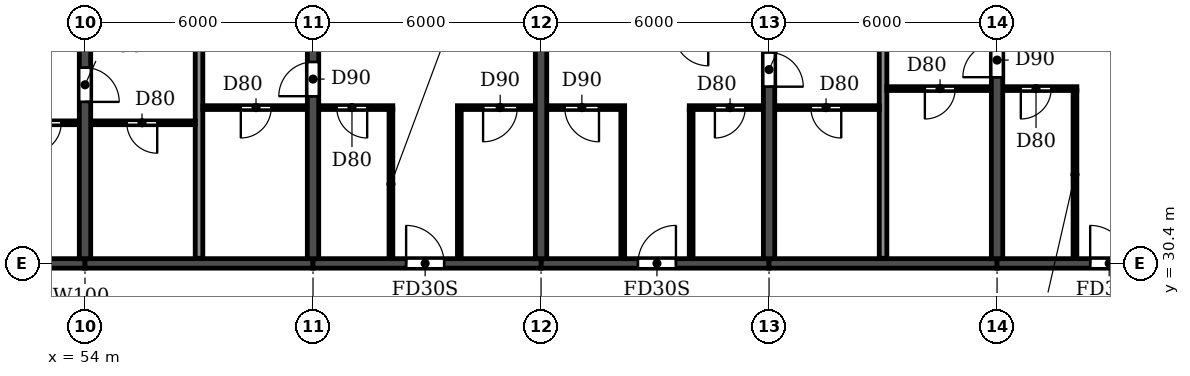
"""IFC4 building model, lengths in metres.
Left out: names, types, materials, properties, quantities, classifications, styles, units other than length and angle.
Written with IfcOpenShell. Run it as: python <this file> out.ifc"""

import sys

from ifc_helpers import new_model, si_unit, direction, frame, frame_2d, origin, place, context, subcontext, project, spatial, rectangle, extrude, element, fill, save


model = new_model("IFC4")
c1 = context("Model", 3, precision=1e-05, world=origin(), true_north=direction((0.0, 1.0)))
c2 = subcontext(c1, "Body", "Model", "MODEL_VIEW")
j1 = project(units=[si_unit("LENGTHUNIT", "METRE"), si_unit("PLANEANGLEUNIT", "RADIAN")], contexts=[c1])
p1 = place(None, origin())
s1 = spatial("IfcSite", under=j1, at=p1, CompositionType="ELEMENT")
p2 = place(p1, origin())
s2 = spatial("IfcBuilding", under=s1, at=p2, CompositionType="ELEMENT")
p3 = place(p2, frame((0.0, 0.0, 122.4)))
s3 = spatial("IfcBuildingStorey", under=s2, at=p3, CompositionType="ELEMENT", Elevation=122.4)
p4 = place(p3, frame((54.0, 30.525, 0.0), z_axis=(0.0, 0.0, 1.0), x_axis=(0.0, 1.0, 0.0)))
e1 = element("IfcWall", 1, at=p4, inside=s3, PredefinedType="SHEAR", context=c2, shape_type="SweptSolid", body=[
    extrude(rectangle(XDim=11.675, YDim=0.3, at=frame_2d((5.837, 0.0))), origin(), (0.0, 0.0, 1.0), 3.07),
])
p5 = place(p4, frame((4.125, 0.0, 0.0)))
e2 = element("IfcOpeningElement", 2, at=p5, cuts=e1, PredefinedType="OPENING", context=c2, shape_type="SweptSolid", body=[
    extrude(rectangle(XDim=0.9, YDim=2.1, at=frame_2d((0.45, 1.05))), frame((0.0, 0.16, 0.0), z_axis=(0.0, -1.0, 0.0), x_axis=(1.0, 0.0, 0.0)), (0.0, 0.0, 1.0), 0.32),
])
p6 = place(p3, frame((60.0, 30.525, 0.0), z_axis=(0.0, 0.0, 1.0), x_axis=(0.0, 1.0, 0.0)))
e3 = element("IfcWall", 3, at=p6, inside=s3, PredefinedType="SHEAR", context=c2, shape_type="SweptSolid", body=[
    extrude(rectangle(XDim=11.675, YDim=0.3, at=frame_2d((5.837, 0.0))), origin(), (0.0, 0.0, 1.0), 3.07),
])
p7 = place(p6, frame((4.275, 0.0, 0.0)))
e4 = element("IfcOpeningElement", 4, at=p7, cuts=e3, PredefinedType="OPENING", context=c2, shape_type="SweptSolid", body=[
    extrude(rectangle(XDim=0.9, YDim=2.1, at=frame_2d((0.45, 1.05))), frame((0.0, 0.16, 0.0), z_axis=(0.0, -1.0, 0.0), x_axis=(1.0, 0.0, 0.0)), (0.0, 0.0, 1.0), 0.32),
])
p8 = place(p3, frame((66.0, 30.525, 0.0), z_axis=(0.0, 0.0, 1.0), x_axis=(0.0, 1.0, 0.0)))
e5 = element("IfcWall", 5, at=p8, inside=s3, PredefinedType="SHEAR", context=c2, shape_type="SweptSolid", body=[
    extrude(rectangle(XDim=11.675, YDim=0.3, at=frame_2d((5.837, 0.0))), origin(), (0.0, 0.0, 1.0), 3.07),
])
p9 = place(p3, frame((72.0, 30.525, 0.0), z_axis=(0.0, 0.0, 1.0), x_axis=(0.0, 1.0, 0.0)))
e6 = element("IfcWall", 6, at=p9, inside=s3, PredefinedType="SHEAR", context=c2, shape_type="SweptSolid", body=[
    extrude(rectangle(XDim=11.675, YDim=0.3, at=frame_2d((5.837, 0.0))), origin(), (0.0, 0.0, 1.0), 3.07),
])
p10 = place(p9, frame((4.525, 0.0, 0.0)))
e7 = element("IfcOpeningElement", 7, at=p10, cuts=e6, PredefinedType="OPENING", context=c2, shape_type="SweptSolid", body=[
    extrude(rectangle(XDim=0.9, YDim=2.1, at=frame_2d((0.45, 1.05))), frame((0.0, 0.16, 0.0), z_axis=(0.0, -1.0, 0.0), x_axis=(1.0, 0.0, 0.0)), (0.0, 0.0, 1.0), 0.32),
])
p11 = place(p3, frame((78.0, 30.525, 0.0), z_axis=(0.0, 0.0, 1.0), x_axis=(0.0, 1.0, 0.0)))
e8 = element("IfcWall", 8, at=p11, inside=s3, PredefinedType="SHEAR", context=c2, shape_type="SweptSolid", body=[
    extrude(rectangle(XDim=11.675, YDim=0.3, at=frame_2d((5.837, 0.0))), origin(), (0.0, 0.0, 1.0), 3.07),
])
p12 = place(p11, frame((4.775, 0.0, 0.0)))
e9 = element("IfcOpeningElement", 9, at=p12, cuts=e8, PredefinedType="OPENING", context=c2, shape_type="SweptSolid", body=[
    extrude(rectangle(XDim=0.9, YDim=2.1, at=frame_2d((0.45, 1.05))), frame((0.0, 0.16, 0.0), z_axis=(0.0, -1.0, 0.0), x_axis=(1.0, 0.0, 0.0)), (0.0, 0.0, 1.0), 0.32),
])
p13 = place(p3, frame((48.0, 30.4, 0.0), z_axis=(0.0, 0.0, 1.0), x_axis=(1.0, 0.0, 0.0)))
e10 = element("IfcWall", 10, at=p13, inside=s3, PredefinedType="SHEAR", context=c2, shape_type="SweptSolid", body=[
    extrude(rectangle(XDim=6.0, YDim=0.25, at=frame_2d((3.0, 0.0))), origin(), (0.0, 0.0, 1.0), 2.47),
])
p14 = place(p13, frame((2.55, 0.0, 0.0)))
e11 = element("IfcOpeningElement", 11, at=p14, cuts=e10, PredefinedType="OPENING", context=c2, shape_type="SweptSolid", body=[
    extrude(rectangle(XDim=1.0, YDim=2.1, at=frame_2d((0.5, 1.05))), frame((0.0, 0.135, 0.0), z_axis=(0.0, -1.0, 0.0), x_axis=(1.0, 0.0, 0.0)), (0.0, 0.0, 1.0), 0.27),
])
p15 = place(p3, frame((54.0, 30.4, 0.0), z_axis=(0.0, 0.0, 1.0), x_axis=(1.0, 0.0, 0.0)))
e12 = element("IfcWall", 12, at=p15, inside=s3, PredefinedType="SHEAR", context=c2, shape_type="SweptSolid", body=[
    extrude(rectangle(XDim=6.0, YDim=0.25, at=frame_2d((3.0, 0.0))), origin(), (0.0, 0.0, 1.0), 2.47),
])
p16 = place(p3, frame((60.0, 30.4, 0.0), z_axis=(0.0, 0.0, 1.0), x_axis=(1.0, 0.0, 0.0)))
e13 = element("IfcWall", 13, at=p16, inside=s3, PredefinedType="SHEAR", context=c2, shape_type="SweptSolid", body=[
    extrude(rectangle(XDim=6.0, YDim=0.25, at=frame_2d((3.0, 0.0))), origin(), (0.0, 0.0, 1.0), 2.47),
])
p17 = place(p16, frame((2.45, 0.0, 0.0)))
e14 = element("IfcOpeningElement", 14, at=p17, cuts=e13, PredefinedType="OPENING", context=c2, shape_type="SweptSolid", body=[
    extrude(rectangle(XDim=1.0, YDim=2.1, at=frame_2d((0.5, 1.05))), frame((0.0, 0.135, 0.0), z_axis=(0.0, -1.0, 0.0), x_axis=(1.0, 0.0, 0.0)), (0.0, 0.0, 1.0), 0.27),
])
p18 = place(p3, frame((66.0, 30.4, 0.0), z_axis=(0.0, 0.0, 1.0), x_axis=(1.0, 0.0, 0.0)))
e15 = element("IfcWall", 15, at=p18, inside=s3, PredefinedType="SHEAR", context=c2, shape_type="SweptSolid", body=[
    extrude(rectangle(XDim=6.0, YDim=0.25, at=frame_2d((3.0, 0.0))), origin(), (0.0, 0.0, 1.0), 2.47),
])
p19 = place(p18, frame((2.55, 0.0, 0.0)))
e16 = element("IfcOpeningElement", 16, at=p19, cuts=e15, PredefinedType="OPENING", context=c2, shape_type="SweptSolid", body=[
    extrude(rectangle(XDim=1.0, YDim=2.1, at=frame_2d((0.5, 1.05))), frame((0.0, 0.135, 0.0), z_axis=(0.0, -1.0, 0.0), x_axis=(1.0, 0.0, 0.0)), (0.0, 0.0, 1.0), 0.27),
])
p20 = place(p3, frame((72.0, 30.4, 0.0), z_axis=(0.0, 0.0, 1.0), x_axis=(1.0, 0.0, 0.0)))
e17 = element("IfcWall", 17, at=p20, inside=s3, PredefinedType="SHEAR", context=c2, shape_type="SweptSolid", body=[
    extrude(rectangle(XDim=6.0, YDim=0.25, at=frame_2d((3.0, 0.0))), origin(), (0.0, 0.0, 1.0), 2.47),
])
p21 = place(p3, frame((78.0, 30.4, 0.0), z_axis=(0.0, 0.0, 1.0), x_axis=(1.0, 0.0, 0.0)))
e18 = element("IfcWall", 18, at=p21, inside=s3, PredefinedType="SHEAR", context=c2, shape_type="SweptSolid", body=[
    extrude(rectangle(XDim=6.0, YDim=0.25, at=frame_2d((3.0, 0.0))), origin(), (0.0, 0.0, 1.0), 2.47),
])
p22 = place(p21, frame((2.45, 0.0, 0.0)))
e19 = element("IfcOpeningElement", 19, at=p22, cuts=e18, PredefinedType="OPENING", context=c2, shape_type="SweptSolid", body=[
    extrude(rectangle(XDim=1.0, YDim=2.1, at=frame_2d((0.5, 1.05))), frame((0.0, 0.135, 0.0), z_axis=(0.0, -1.0, 0.0), x_axis=(1.0, 0.0, 0.0)), (0.0, 0.0, 1.0), 0.27),
])
for number, where, z_axis, x_axis in (
    (20, (57.0, 30.535, 0.0), (0.0, 0.0, 1.0), (0.0, 1.0, 0.0)),
    (21, (75.0, 30.535, 0.0), (0.0, 0.0, 1.0), (0.0, 1.0, 0.0)),
):
    element("IfcWall", number, at=place(p3, frame(where, z_axis=z_axis, x_axis=x_axis)), inside=s3, PredefinedType="PARTITIONING", context=c2, shape_type="SweptSolid", body=[
        extrude(rectangle(XDim=11.805, YDim=0.2, at=frame_2d((5.903, 0.0))), origin(), (0.0, 0.0, 1.0), 3.07),
    ])
p23 = place(p3, frame((51.9, 34.1, 0.0), z_axis=(0.0, 0.0, 1.0), x_axis=(1.0, 0.0, 0.0)))
e22 = element("IfcWall", 22, at=p23, inside=s3, PredefinedType="PARTITIONING", context=c2, shape_type="SweptSolid", body=[
    extrude(rectangle(XDim=1.94, YDim=0.1, at=frame_2d((0.97, 0.0))), origin(), (0.0, 0.0, 1.0), 3.07),
])
p24 = place(p23, frame((0.675, 0.0, 0.0)))
e23 = element("IfcOpeningElement", 23, at=p24, cuts=e22, PredefinedType="OPENING", context=c2, shape_type="SweptSolid", body=[
    extrude(rectangle(XDim=0.8, YDim=2.1, at=frame_2d((0.4, 1.05))), frame((0.0, 0.06, 0.0), z_axis=(0.0, -1.0, 0.0), x_axis=(1.0, 0.0, 0.0)), (0.0, 0.0, 1.0), 0.12),
])
p25 = place(p3, frame((54.16, 34.1, 0.0), z_axis=(0.0, 0.0, 1.0), x_axis=(1.0, 0.0, 0.0)))
e24 = element("IfcWall", 24, at=p25, inside=s3, PredefinedType="PARTITIONING", context=c2, shape_type="SweptSolid", body=[
    extrude(rectangle(XDim=2.74, YDim=0.1, at=frame_2d((1.37, 0.0))), origin(), (0.0, 0.0, 1.0), 3.07),
])
p26 = place(p25, frame((0.94, 0.0, 0.0)))
e25 = element("IfcOpeningElement", 25, at=p26, cuts=e24, PredefinedType="OPENING", context=c2, shape_type="SweptSolid", body=[
    extrude(rectangle(XDim=0.8, YDim=2.1, at=frame_2d((0.4, 1.05))), frame((0.0, 0.06, 0.0), z_axis=(0.0, -1.0, 0.0), x_axis=(1.0, 0.0, 0.0)), (0.0, 0.0, 1.0), 0.12),
])
p27 = place(p3, frame((57.1, 34.5, 0.0), z_axis=(0.0, 0.0, 1.0), x_axis=(1.0, 0.0, 0.0)))
e26 = element("IfcWall", 26, at=p27, inside=s3, PredefinedType="PARTITIONING", context=c2, shape_type="SweptSolid", body=[
    extrude(rectangle(XDim=2.74, YDim=0.1, at=frame_2d((1.37, 0.0))), origin(), (0.0, 0.0, 1.0), 3.07),
])
p28 = place(p27, frame((1.0, 0.0, 0.0)))
e27 = element("IfcOpeningElement", 27, at=p28, cuts=e26, PredefinedType="OPENING", context=c2, shape_type="SweptSolid", body=[
    extrude(rectangle(XDim=0.8, YDim=2.1, at=frame_2d((0.4, 1.05))), frame((0.0, 0.06, 0.0), z_axis=(0.0, -1.0, 0.0), x_axis=(1.0, 0.0, 0.0)), (0.0, 0.0, 1.0), 0.12),
])
p29 = place(p3, frame((60.16, 34.5, 0.0), z_axis=(0.0, 0.0, 1.0), x_axis=(1.0, 0.0, 0.0)))
e28 = element("IfcWall", 28, at=p29, inside=s3, PredefinedType="PARTITIONING", context=c2, shape_type="SweptSolid", body=[
    extrude(rectangle(XDim=1.94, YDim=0.1, at=frame_2d((0.97, 0.0))), origin(), (0.0, 0.0, 1.0), 3.07),
])
p30 = place(p29, frame((0.465, 0.0, 0.0)))
e29 = element("IfcOpeningElement", 29, at=p30, cuts=e28, PredefinedType="OPENING", context=c2, shape_type="SweptSolid", body=[
    extrude(rectangle(XDim=0.8, YDim=2.1, at=frame_2d((0.4, 1.05))), frame((0.0, 0.06, 0.0), z_axis=(0.0, -1.0, 0.0), x_axis=(1.0, 0.0, 0.0)), (0.0, 0.0, 1.0), 0.12),
])
p31 = place(p3, frame((63.8, 34.5, 0.0), z_axis=(0.0, 0.0, 1.0), x_axis=(1.0, 0.0, 0.0)))
e30 = element("IfcWall", 30, at=p31, inside=s3, PredefinedType="PARTITIONING", context=c2, shape_type="SweptSolid", body=[
    extrude(rectangle(XDim=2.04, YDim=0.1, at=frame_2d((1.02, 0.0))), origin(), (0.0, 0.0, 1.0), 3.07),
])
p32 = place(p31, frame((0.675, 0.0, 0.0)))
e31 = element("IfcOpeningElement", 31, at=p32, cuts=e30, PredefinedType="OPENING", context=c2, shape_type="SweptSolid", body=[
    extrude(rectangle(XDim=0.9, YDim=2.1, at=frame_2d((0.45, 1.05))), frame((0.0, 0.06, 0.0), z_axis=(0.0, -1.0, 0.0), x_axis=(1.0, 0.0, 0.0)), (0.0, 0.0, 1.0), 0.12),
])
p33 = place(p3, frame((66.16, 34.5, 0.0), z_axis=(0.0, 0.0, 1.0), x_axis=(1.0, 0.0, 0.0)))
e32 = element("IfcWall", 32, at=p33, inside=s3, PredefinedType="PARTITIONING", context=c2, shape_type="SweptSolid", body=[
    extrude(rectangle(XDim=2.04, YDim=0.1, at=frame_2d((1.02, 0.0))), origin(), (0.0, 0.0, 1.0), 3.07),
])
p34 = place(p33, frame((0.465, 0.0, 0.0)))
e33 = element("IfcOpeningElement", 33, at=p34, cuts=e32, PredefinedType="OPENING", context=c2, shape_type="SweptSolid", body=[
    extrude(rectangle(XDim=0.9, YDim=2.1, at=frame_2d((0.45, 1.05))), frame((0.0, 0.06, 0.0), z_axis=(0.0, -1.0, 0.0), x_axis=(1.0, 0.0, 0.0)), (0.0, 0.0, 1.0), 0.12),
])
p35 = place(p3, frame((69.9, 34.5, 0.0), z_axis=(0.0, 0.0, 1.0), x_axis=(1.0, 0.0, 0.0)))
e34 = element("IfcWall", 34, at=p35, inside=s3, PredefinedType="PARTITIONING", context=c2, shape_type="SweptSolid", body=[
    extrude(rectangle(XDim=1.94, YDim=0.1, at=frame_2d((0.97, 0.0))), origin(), (0.0, 0.0, 1.0), 3.07),
])
p36 = place(p35, frame((0.675, 0.0, 0.0)))
e35 = element("IfcOpeningElement", 35, at=p36, cuts=e34, PredefinedType="OPENING", context=c2, shape_type="SweptSolid", body=[
    extrude(rectangle(XDim=0.8, YDim=2.1, at=frame_2d((0.4, 1.05))), frame((0.0, 0.06, 0.0), z_axis=(0.0, -1.0, 0.0), x_axis=(1.0, 0.0, 0.0)), (0.0, 0.0, 1.0), 0.12),
])
p37 = place(p3, frame((72.16, 34.5, 0.0), z_axis=(0.0, 0.0, 1.0), x_axis=(1.0, 0.0, 0.0)))
e36 = element("IfcWall", 36, at=p37, inside=s3, PredefinedType="PARTITIONING", context=c2, shape_type="SweptSolid", body=[
    extrude(rectangle(XDim=2.74, YDim=0.1, at=frame_2d((1.37, 0.0))), origin(), (0.0, 0.0, 1.0), 3.07),
])
p38 = place(p37, frame((0.94, 0.0, 0.0)))
e37 = element("IfcOpeningElement", 37, at=p38, cuts=e36, PredefinedType="OPENING", context=c2, shape_type="SweptSolid", body=[
    extrude(rectangle(XDim=0.8, YDim=2.1, at=frame_2d((0.4, 1.05))), frame((0.0, 0.06, 0.0), z_axis=(0.0, -1.0, 0.0), x_axis=(1.0, 0.0, 0.0)), (0.0, 0.0, 1.0), 0.12),
])
p39 = place(p3, frame((75.1, 35.0, 0.0), z_axis=(0.0, 0.0, 1.0), x_axis=(1.0, 0.0, 0.0)))
e38 = element("IfcWall", 38, at=p39, inside=s3, PredefinedType="PARTITIONING", context=c2, shape_type="SweptSolid", body=[
    extrude(rectangle(XDim=2.74, YDim=0.1, at=frame_2d((1.37, 0.0))), origin(), (0.0, 0.0, 1.0), 3.07),
])
p40 = place(p39, frame((1.0, 0.0, 0.0)))
e39 = element("IfcOpeningElement", 39, at=p40, cuts=e38, PredefinedType="OPENING", context=c2, shape_type="SweptSolid", body=[
    extrude(rectangle(XDim=0.8, YDim=2.1, at=frame_2d((0.4, 1.05))), frame((0.0, 0.06, 0.0), z_axis=(0.0, -1.0, 0.0), x_axis=(1.0, 0.0, 0.0)), (0.0, 0.0, 1.0), 0.12),
])
p41 = place(p3, frame((78.16, 35.0, 0.0), z_axis=(0.0, 0.0, 1.0), x_axis=(1.0, 0.0, 0.0)))
e40 = element("IfcWall", 40, at=p41, inside=s3, PredefinedType="PARTITIONING", context=c2, shape_type="SweptSolid", body=[
    extrude(rectangle(XDim=1.94, YDim=0.1, at=frame_2d((0.97, 0.0))), origin(), (0.0, 0.0, 1.0), 3.07),
])
p42 = place(p41, frame((0.465, 0.0, 0.0)))
e41 = element("IfcOpeningElement", 41, at=p42, cuts=e40, PredefinedType="OPENING", context=c2, shape_type="SweptSolid", body=[
    extrude(rectangle(XDim=0.8, YDim=2.1, at=frame_2d((0.4, 1.05))), frame((0.0, 0.06, 0.0), z_axis=(0.0, -1.0, 0.0), x_axis=(1.0, 0.0, 0.0)), (0.0, 0.0, 1.0), 0.12),
])
for number, where, z_axis, x_axis in (
    (42, (62.05, 30.535, 0.0), (0.0, 0.0, 1.0), (0.0, 1.0, 0.0)),
    (43, (63.85, 30.535, 0.0), (0.0, 0.0, 1.0), (0.0, 1.0, 0.0)),
    (44, (68.15, 30.535, 0.0), (0.0, 0.0, 1.0), (0.0, 1.0, 0.0)),
    (45, (69.95, 30.535, 0.0), (0.0, 0.0, 1.0), (0.0, 1.0, 0.0)),
):
    element("IfcWall", number, at=place(p3, frame(where, z_axis=z_axis, x_axis=x_axis)), inside=s3, PredefinedType="PARTITIONING", context=c2, shape_type="SweptSolid", body=[
        extrude(rectangle(XDim=3.915, YDim=0.1, at=frame_2d((1.958, 0.0))), origin(), (0.0, 0.0, 1.0), 3.07),
    ])
p43 = place(p3, frame((80.05, 30.535, 0.0), z_axis=(0.0, 0.0, 1.0), x_axis=(0.0, 1.0, 0.0)))
e46 = element("IfcWall", 46, at=p43, inside=s3, PredefinedType="PARTITIONING", context=c2, shape_type="SweptSolid", body=[
    extrude(rectangle(XDim=4.415, YDim=0.1, at=frame_2d((2.208, 0.0))), origin(), (0.0, 0.0, 1.0), 3.07),
])
p44 = place(p26, frame((0.8, 0.0, 0.0), z_axis=(0.0, 0.0, 1.0), x_axis=(-1.0, 0.0, 0.0)))
e47 = element("IfcDoor", 47, at=p44, inside=s3, OperationType="SINGLE_SWING_LEFT", PredefinedType="DOOR", context=c2, shape_type="SweptSolid", body=[
    extrude(rectangle(XDim=0.8, YDim=2.1, at=frame_2d((0.4, 1.05))), frame((0.0, 0.025, 0.0), z_axis=(0.0, -1.0, 0.0), x_axis=(1.0, 0.0, 0.0)), (0.0, 0.0, 1.0), 0.05),
])
fill(e25, e47)
p45 = place(p24, frame((0.8, 0.0, 0.0), z_axis=(0.0, 0.0, 1.0), x_axis=(-1.0, 0.0, 0.0)))
e48 = element("IfcDoor", 48, at=p45, inside=s3, OperationType="SINGLE_SWING_RIGHT", PredefinedType="DOOR", context=c2, shape_type="SweptSolid", body=[
    extrude(rectangle(XDim=0.8, YDim=2.1, at=frame_2d((0.4, 1.05))), frame((0.0, 0.025, 0.0), z_axis=(0.0, -1.0, 0.0), x_axis=(1.0, 0.0, 0.0)), (0.0, 0.0, 1.0), 0.05),
])
fill(e23, e48)
p46 = place(p5, frame((0.9, 0.0, 0.0), z_axis=(0.0, 0.0, 1.0), x_axis=(-1.0, 0.0, 0.0)))
e49 = element("IfcDoor", 49, at=p46, inside=s3, OperationType="SINGLE_SWING_RIGHT", PredefinedType="DOOR", context=c2, shape_type="SweptSolid", body=[
    extrude(rectangle(XDim=0.9, YDim=2.1, at=frame_2d((0.45, 1.05))), frame((0.0, 0.025, 0.0), z_axis=(0.0, -1.0, 0.0), x_axis=(1.0, 0.0, 0.0)), (0.0, 0.0, 1.0), 0.05),
])
fill(e2, e49)
p47 = place(p28, frame((0.8, 0.0, 0.0), z_axis=(0.0, 0.0, 1.0), x_axis=(-1.0, 0.0, 0.0)))
e50 = element("IfcDoor", 50, at=p47, inside=s3, OperationType="SINGLE_SWING_RIGHT", PredefinedType="DOOR", context=c2, shape_type="SweptSolid", body=[
    extrude(rectangle(XDim=0.8, YDim=2.1, at=frame_2d((0.4, 1.05))), frame((0.0, 0.025, 0.0), z_axis=(0.0, -1.0, 0.0), x_axis=(1.0, 0.0, 0.0)), (0.0, 0.0, 1.0), 0.05),
])
fill(e27, e50)
p48 = place(p7, origin())
e51 = element("IfcDoor", 51, at=p48, inside=s3, OperationType="SINGLE_SWING_LEFT", PredefinedType="DOOR", context=c2, shape_type="SweptSolid", body=[
    extrude(rectangle(XDim=0.9, YDim=2.1, at=frame_2d((0.45, 1.05))), frame((0.0, 0.025, 0.0), z_axis=(0.0, -1.0, 0.0), x_axis=(1.0, 0.0, 0.0)), (0.0, 0.0, 1.0), 0.05),
])
fill(e4, e51)
p49 = place(p30, frame((0.8, 0.0, 0.0), z_axis=(0.0, 0.0, 1.0), x_axis=(-1.0, 0.0, 0.0)))
e52 = element("IfcDoor", 52, at=p49, inside=s3, OperationType="SINGLE_SWING_LEFT", PredefinedType="DOOR", context=c2, shape_type="SweptSolid", body=[
    extrude(rectangle(XDim=0.8, YDim=2.1, at=frame_2d((0.4, 1.05))), frame((0.0, 0.025, 0.0), z_axis=(0.0, -1.0, 0.0), x_axis=(1.0, 0.0, 0.0)), (0.0, 0.0, 1.0), 0.05),
])
fill(e29, e52)
p50 = place(p17, origin())
e53 = element("IfcDoor", 53, at=p50, inside=s3, OperationType="SINGLE_SWING_LEFT", PredefinedType="DOOR", context=c2, shape_type="SweptSolid", body=[
    extrude(rectangle(XDim=1.0, YDim=2.1, at=frame_2d((0.5, 1.05))), frame((0.0, 0.025, 0.0), z_axis=(0.0, -1.0, 0.0), x_axis=(1.0, 0.0, 0.0)), (0.0, 0.0, 1.0), 0.05),
])
fill(e14, e53)
p51 = place(p32, frame((0.9, 0.0, 0.0), z_axis=(0.0, 0.0, 1.0), x_axis=(-1.0, 0.0, 0.0)))
e54 = element("IfcDoor", 54, at=p51, inside=s3, OperationType="SINGLE_SWING_RIGHT", PredefinedType="DOOR", context=c2, shape_type="SweptSolid", body=[
    extrude(rectangle(XDim=0.9, YDim=2.1, at=frame_2d((0.45, 1.05))), frame((0.0, 0.025, 0.0), z_axis=(0.0, -1.0, 0.0), x_axis=(1.0, 0.0, 0.0)), (0.0, 0.0, 1.0), 0.05),
])
fill(e31, e54)
p52 = place(p38, frame((0.8, 0.0, 0.0), z_axis=(0.0, 0.0, 1.0), x_axis=(-1.0, 0.0, 0.0)))
e55 = element("IfcDoor", 55, at=p52, inside=s3, OperationType="SINGLE_SWING_LEFT", PredefinedType="DOOR", context=c2, shape_type="SweptSolid", body=[
    extrude(rectangle(XDim=0.8, YDim=2.1, at=frame_2d((0.4, 1.05))), frame((0.0, 0.025, 0.0), z_axis=(0.0, -1.0, 0.0), x_axis=(1.0, 0.0, 0.0)), (0.0, 0.0, 1.0), 0.05),
])
fill(e37, e55)
p53 = place(p34, frame((0.9, 0.0, 0.0), z_axis=(0.0, 0.0, 1.0), x_axis=(-1.0, 0.0, 0.0)))
e56 = element("IfcDoor", 56, at=p53, inside=s3, OperationType="SINGLE_SWING_LEFT", PredefinedType="DOOR", context=c2, shape_type="SweptSolid", body=[
    extrude(rectangle(XDim=0.9, YDim=2.1, at=frame_2d((0.45, 1.05))), frame((0.0, 0.025, 0.0), z_axis=(0.0, -1.0, 0.0), x_axis=(1.0, 0.0, 0.0)), (0.0, 0.0, 1.0), 0.05),
])
fill(e33, e56)
p54 = place(p19, origin())
e57 = element("IfcDoor", 57, at=p54, inside=s3, OperationType="SINGLE_SWING_RIGHT", PredefinedType="DOOR", context=c2, shape_type="SweptSolid", body=[
    extrude(rectangle(XDim=1.0, YDim=2.1, at=frame_2d((0.5, 1.05))), frame((0.0, 0.025, 0.0), z_axis=(0.0, -1.0, 0.0), x_axis=(1.0, 0.0, 0.0)), (0.0, 0.0, 1.0), 0.05),
])
fill(e16, e57)
p55 = place(p36, frame((0.8, 0.0, 0.0), z_axis=(0.0, 0.0, 1.0), x_axis=(-1.0, 0.0, 0.0)))
e58 = element("IfcDoor", 58, at=p55, inside=s3, OperationType="SINGLE_SWING_RIGHT", PredefinedType="DOOR", context=c2, shape_type="SweptSolid", body=[
    extrude(rectangle(XDim=0.8, YDim=2.1, at=frame_2d((0.4, 1.05))), frame((0.0, 0.025, 0.0), z_axis=(0.0, -1.0, 0.0), x_axis=(1.0, 0.0, 0.0)), (0.0, 0.0, 1.0), 0.05),
])
fill(e35, e58)
p56 = place(p10, frame((0.9, 0.0, 0.0), z_axis=(0.0, 0.0, 1.0), x_axis=(-1.0, 0.0, 0.0)))
e59 = element("IfcDoor", 59, at=p56, inside=s3, OperationType="SINGLE_SWING_RIGHT", PredefinedType="DOOR", context=c2, shape_type="SweptSolid", body=[
    extrude(rectangle(XDim=0.9, YDim=2.1, at=frame_2d((0.45, 1.05))), frame((0.0, 0.025, 0.0), z_axis=(0.0, -1.0, 0.0), x_axis=(1.0, 0.0, 0.0)), (0.0, 0.0, 1.0), 0.05),
])
fill(e7, e59)
p57 = place(p40, frame((0.8, 0.0, 0.0), z_axis=(0.0, 0.0, 1.0), x_axis=(-1.0, 0.0, 0.0)))
e60 = element("IfcDoor", 60, at=p57, inside=s3, OperationType="SINGLE_SWING_RIGHT", PredefinedType="DOOR", context=c2, shape_type="SweptSolid", body=[
    extrude(rectangle(XDim=0.8, YDim=2.1, at=frame_2d((0.4, 1.05))), frame((0.0, 0.025, 0.0), z_axis=(0.0, -1.0, 0.0), x_axis=(1.0, 0.0, 0.0)), (0.0, 0.0, 1.0), 0.05),
])
fill(e39, e60)
p58 = place(p12, origin())
e61 = element("IfcDoor", 61, at=p58, inside=s3, OperationType="SINGLE_SWING_LEFT", PredefinedType="DOOR", context=c2, shape_type="SweptSolid", body=[
    extrude(rectangle(XDim=0.9, YDim=2.1, at=frame_2d((0.45, 1.05))), frame((0.0, 0.025, 0.0), z_axis=(0.0, -1.0, 0.0), x_axis=(1.0, 0.0, 0.0)), (0.0, 0.0, 1.0), 0.05),
])
fill(e9, e61)
p59 = place(p42, frame((0.8, 0.0, 0.0), z_axis=(0.0, 0.0, 1.0), x_axis=(-1.0, 0.0, 0.0)))
e62 = element("IfcDoor", 62, at=p59, inside=s3, OperationType="SINGLE_SWING_RIGHT", PredefinedType="DOOR", context=c2, shape_type="SweptSolid", body=[
    extrude(rectangle(XDim=0.8, YDim=2.1, at=frame_2d((0.4, 1.05))), frame((0.0, 0.025, 0.0), z_axis=(0.0, -1.0, 0.0), x_axis=(1.0, 0.0, 0.0)), (0.0, 0.0, 1.0), 0.05),
])
fill(e41, e62)
p60 = place(p22, origin())
e63 = element("IfcDoor", 63, at=p60, inside=s3, OperationType="SINGLE_SWING_LEFT", PredefinedType="DOOR", context=c2, shape_type="SweptSolid", body=[
    extrude(rectangle(XDim=1.0, YDim=2.1, at=frame_2d((0.5, 1.05))), frame((0.0, 0.025, 0.0), z_axis=(0.0, -1.0, 0.0), x_axis=(1.0, 0.0, 0.0)), (0.0, 0.0, 1.0), 0.05),
])
fill(e19, e63)
save(model, sys.argv[1])
